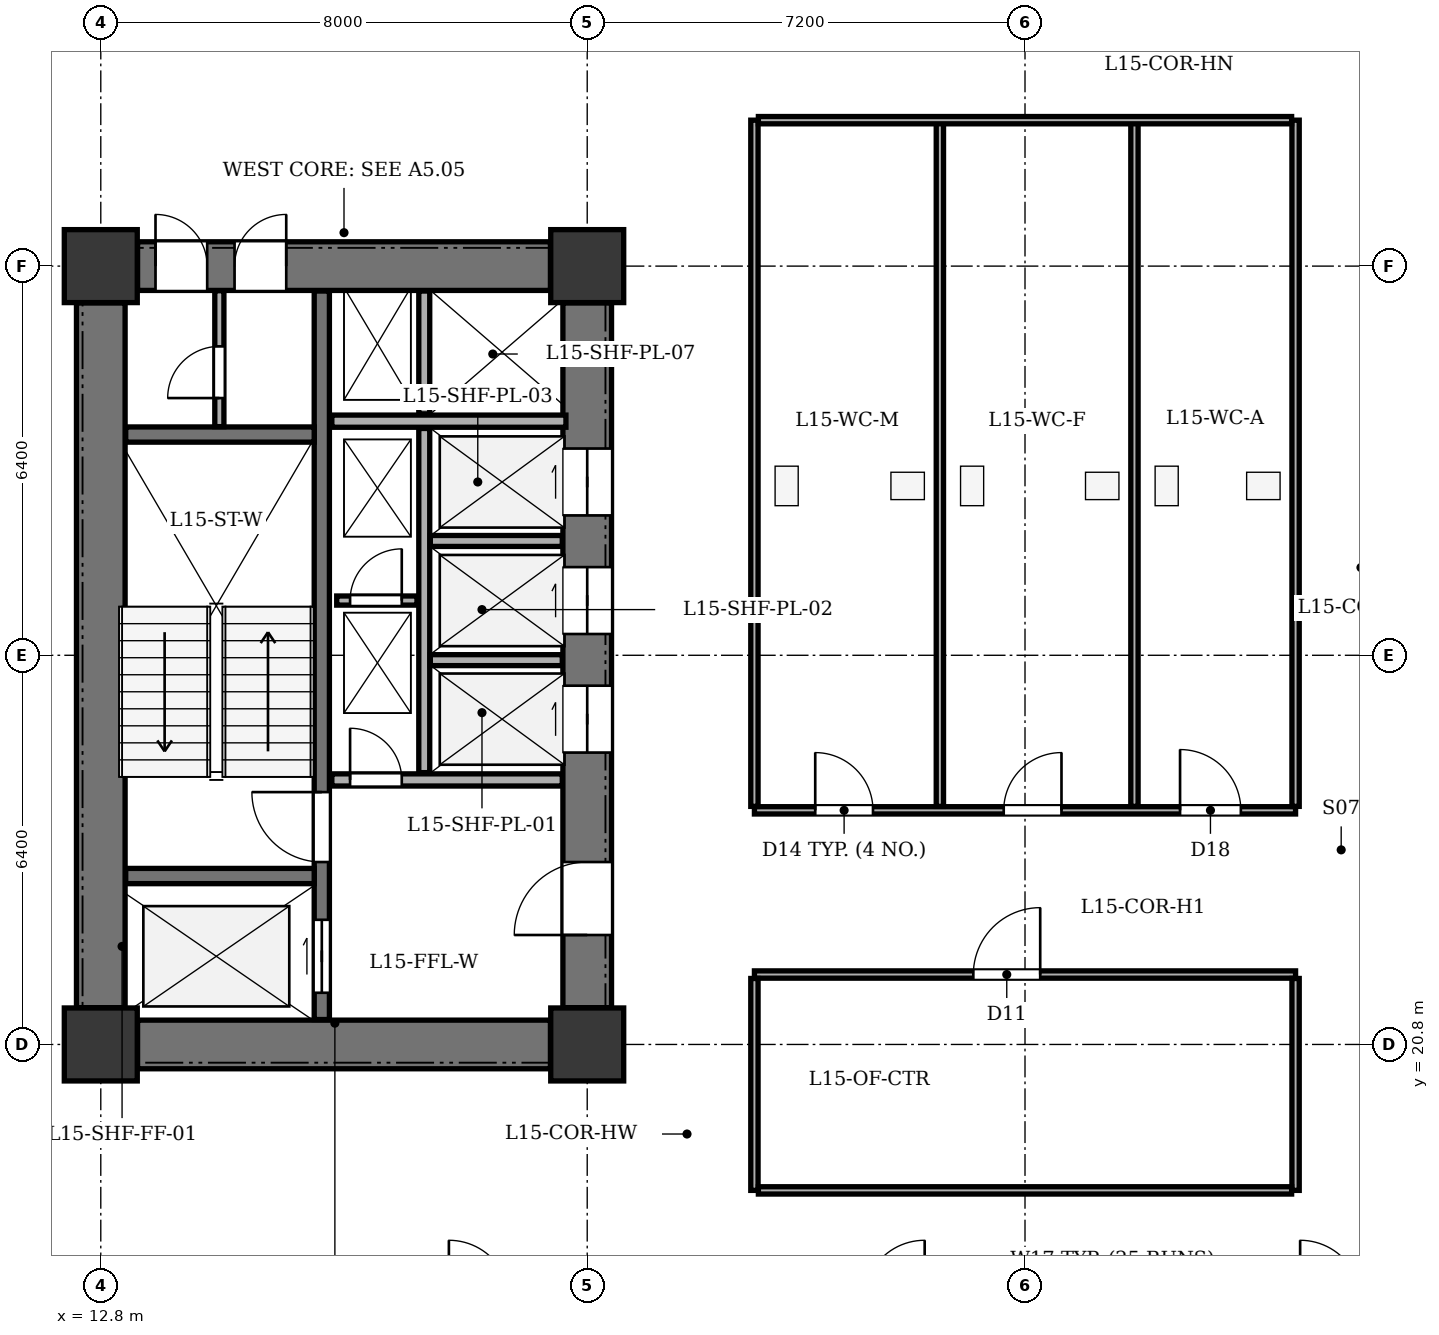
"""IFC4 building model, lengths in metres.
Left out: names, types, materials, properties, quantities, classifications, styles, units other than length and angle.
Written with IfcOpenShell. Run it as: python <this file> out.ifc"""

import sys

from ifc_helpers import new_model, si_unit, direction, frame, frame_2d, origin, origin_2d, place, context, subcontext, project, spatial, rectangle, extrude, element, fill, save


model = new_model("IFC4")
c1 = context("Model", 3, precision=1e-05, world=origin(), true_north=direction((0.0, 1.0)))
c2 = subcontext(c1, "Body", "Model", "MODEL_VIEW")
j1 = project(units=[si_unit("LENGTHUNIT", "METRE"), si_unit("PLANEANGLEUNIT", "RADIAN")], contexts=[c1])
p1 = place(None, origin())
s1 = spatial("IfcSite", under=j1, at=p1, CompositionType="ELEMENT")
p2 = place(p1, origin())
s2 = spatial("IfcBuilding", under=s1, at=p2, CompositionType="ELEMENT")
p3 = place(p2, frame((0.0, 0.0, 63.3)))
s3 = spatial("IfcBuildingStorey", under=s2, at=p3, CompositionType="ELEMENT", Elevation=63.3)
for number, where, z_axis, x_axis in (
    (1, (12.8, 20.8, 0.0), (0.0, 0.0, 1.0), (1.0, 0.0, 0.0)),
    (2, (20.8, 20.8, 0.0), (0.0, 0.0, 1.0), (1.0, 0.0, 0.0)),
    (3, (12.8, 33.6, 0.0), (0.0, 0.0, 1.0), (1.0, 0.0, 0.0)),
    (4, (20.8, 33.6, 0.0), (0.0, 0.0, 1.0), (1.0, 0.0, 0.0)),
):
    element("IfcColumn", number, at=place(p3, frame(where, z_axis=z_axis, x_axis=x_axis)), inside=s3, PredefinedType="COLUMN", context=c2, shape_type="SweptSolid", body=[
        extrude(rectangle(XDim=1.2, YDim=1.2, at=origin_2d()), origin(), (0.0, 0.0, 1.0), 3.9),
    ])
p4 = place(p3, frame((12.8, 21.405, 0.0), z_axis=(0.0, 0.0, 1.0), x_axis=(0.0, 1.0, 0.0)))
e5 = element("IfcWall", 5, at=p4, inside=s3, PredefinedType="SHEAR", context=c2, shape_type="SweptSolid", body=[
    extrude(rectangle(XDim=11.59, YDim=0.8, at=frame_2d((5.795, 0.0))), origin(), (0.0, 0.0, 1.0), 3.6),
])
p5 = place(p3, frame((13.405, 20.8, 0.0), z_axis=(0.0, 0.0, 1.0), x_axis=(1.0, 0.0, 0.0)))
e6 = element("IfcWall", 6, at=p5, inside=s3, PredefinedType="SHEAR", context=c2, shape_type="SweptSolid", body=[
    extrude(rectangle(XDim=6.79, YDim=0.8, at=frame_2d((3.395, 0.0))), origin(), (0.0, 0.0, 1.0), 3.6),
])
p6 = place(p3, frame((13.405, 33.6, 0.0), z_axis=(0.0, 0.0, 1.0), x_axis=(1.0, 0.0, 0.0)))
e7 = element("IfcWall", 7, at=p6, inside=s3, PredefinedType="SHEAR", context=c2, shape_type="SweptSolid", body=[
    extrude(rectangle(XDim=6.79, YDim=0.8, at=frame_2d((3.395, 0.0))), origin(), (0.0, 0.0, 1.0), 3.6),
])
p7 = place(p6, frame((0.295, 0.0, 0.0)))
e8 = element("IfcOpeningElement", 8, at=p7, cuts=e7, PredefinedType="OPENING", context=c2, shape_type="SweptSolid", body=[
    extrude(rectangle(XDim=0.85, YDim=2.02, at=frame_2d((0.425, 1.01))), frame((0.0, 0.41, 0.0), z_axis=(0.0, -1.0, 0.0), x_axis=(1.0, 0.0, 0.0)), (0.0, 0.0, 1.0), 0.82),
])
p8 = place(p6, frame((1.595, 0.0, 0.0)))
e9 = element("IfcOpeningElement", 9, at=p8, cuts=e7, PredefinedType="OPENING", context=c2, shape_type="SweptSolid", body=[
    extrude(rectangle(XDim=0.85, YDim=2.02, at=frame_2d((0.425, 1.01))), frame((0.0, 0.41, 0.0), z_axis=(0.0, -1.0, 0.0), x_axis=(1.0, 0.0, 0.0)), (0.0, 0.0, 1.0), 0.82),
])
p9 = place(p3, frame((20.8, 21.405, 0.0), z_axis=(0.0, 0.0, 1.0), x_axis=(0.0, 1.0, 0.0)))
e10 = element("IfcWall", 10, at=p9, inside=s3, PredefinedType="SHEAR", context=c2, shape_type="SweptSolid", body=[
    extrude(rectangle(XDim=11.59, YDim=0.8, at=frame_2d((5.795, 0.0))), origin(), (0.0, 0.0, 1.0), 3.6),
])
p10 = place(p9, frame((1.195, 0.0, 0.0)))
e11 = element("IfcOpeningElement", 11, at=p10, cuts=e10, PredefinedType="OPENING", context=c2, shape_type="SweptSolid", body=[
    extrude(rectangle(XDim=1.2, YDim=2.15, at=frame_2d((0.6, 1.075))), frame((0.0, 0.41, 0.0), z_axis=(0.0, -1.0, 0.0), x_axis=(1.0, 0.0, 0.0)), (0.0, 0.0, 1.0), 0.82),
])
p11 = place(p9, frame((4.195, 0.0, 0.0)))
e12 = element("IfcOpeningElement", 12, at=p11, cuts=e10, PredefinedType="OPENING", context=c2, shape_type="SweptSolid", body=[
    extrude(rectangle(XDim=1.1, YDim=2.1, at=frame_2d((0.55, 1.05))), frame((0.0, 0.41, 0.0), z_axis=(0.0, -1.0, 0.0), x_axis=(1.0, 0.0, 0.0)), (0.0, 0.0, 1.0), 0.82),
])
p12 = place(p9, frame((6.145, 0.0, 0.0)))
e13 = element("IfcOpeningElement", 13, at=p12, cuts=e10, PredefinedType="OPENING", context=c2, shape_type="SweptSolid", body=[
    extrude(rectangle(XDim=1.1, YDim=2.1, at=frame_2d((0.55, 1.05))), frame((0.0, 0.41, 0.0), z_axis=(0.0, -1.0, 0.0), x_axis=(1.0, 0.0, 0.0)), (0.0, 0.0, 1.0), 0.82),
])
p13 = place(p9, frame((8.095, 0.0, 0.0)))
e14 = element("IfcOpeningElement", 14, at=p13, cuts=e10, PredefinedType="OPENING", context=c2, shape_type="SweptSolid", body=[
    extrude(rectangle(XDim=1.1, YDim=2.1, at=frame_2d((0.55, 1.05))), frame((0.0, 0.41, 0.0), z_axis=(0.0, -1.0, 0.0), x_axis=(1.0, 0.0, 0.0)), (0.0, 0.0, 1.0), 0.82),
])
p14 = place(p3, frame((16.435, 21.21, 0.0), z_axis=(0.0, 0.0, 1.0), x_axis=(0.0, 1.0, 0.0)))
e15 = element("IfcWall", 15, at=p14, inside=s3, PredefinedType="SHEAR", context=c2, shape_type="SweptSolid", body=[
    extrude(rectangle(XDim=11.98, YDim=0.25, at=frame_2d((5.99, 0.0))), origin(), (0.0, 0.0, 1.0), 3.6),
])
p15 = place(p14, frame((0.44, 0.0, 0.0)))
e16 = element("IfcOpeningElement", 16, at=p15, cuts=e15, PredefinedType="OPENING", context=c2, shape_type="SweptSolid", body=[
    extrude(rectangle(XDim=1.2, YDim=2.15, at=frame_2d((0.6, 1.075))), frame((0.0, 0.135, 0.0), z_axis=(0.0, -1.0, 0.0), x_axis=(1.0, 0.0, 0.0)), (0.0, 0.0, 1.0), 0.27),
])
p16 = place(p14, frame((2.59, 0.0, 0.0)))
e17 = element("IfcOpeningElement", 17, at=p16, cuts=e15, PredefinedType="OPENING", context=c2, shape_type="SweptSolid", body=[
    extrude(rectangle(XDim=1.15, YDim=2.15, at=frame_2d((0.575, 1.075))), frame((0.0, 0.135, 0.0), z_axis=(0.0, -1.0, 0.0), x_axis=(1.0, 0.0, 0.0)), (0.0, 0.0, 1.0), 0.27),
])
for number, where, z_axis, x_axis in (
    (18, (13.21, 23.57, 0.0), (0.0, 0.0, 1.0), (1.0, 0.0, 0.0)),
    (19, (13.21, 30.83, 0.0), (0.0, 0.0, 1.0), (1.0, 0.0, 0.0)),
):
    element("IfcWall", number, at=place(p3, frame(where, z_axis=z_axis, x_axis=x_axis)), inside=s3, PredefinedType="SHEAR", context=c2, shape_type="SweptSolid", body=[
        extrude(rectangle(XDim=3.1, YDim=0.25, at=frame_2d((1.55, 0.0))), origin(), (0.0, 0.0, 1.0), 3.6),
    ])
p17 = place(p3, frame((16.6, 25.15, 0.0), z_axis=(0.0, 0.0, 1.0), x_axis=(1.0, 0.0, 0.0)))
e20 = element("IfcWall", 20, at=p17, inside=s3, PredefinedType="SOLIDWALL", context=c2, shape_type="SweptSolid", body=[
    extrude(rectangle(XDim=3.79, YDim=0.2, at=frame_2d((1.895, 0.0))), origin(), (0.0, 0.0, 1.0), 3.6),
])
p18 = place(p17, frame((0.3, 0.0, 0.0)))
e21 = element("IfcOpeningElement", 21, at=p18, cuts=e20, PredefinedType="OPENING", context=c2, shape_type="SweptSolid", body=[
    extrude(rectangle(XDim=0.85, YDim=2.02, at=frame_2d((0.425, 1.01))), frame((0.0, 0.11, 0.0), z_axis=(0.0, -1.0, 0.0), x_axis=(1.0, 0.0, 0.0)), (0.0, 0.0, 1.0), 0.22),
])
p19 = place(p3, frame((16.6, 31.05, 0.0), z_axis=(0.0, 0.0, 1.0), x_axis=(1.0, 0.0, 0.0)))
e22 = element("IfcWall", 22, at=p19, inside=s3, PredefinedType="SOLIDWALL", context=c2, shape_type="SweptSolid", body=[
    extrude(rectangle(XDim=3.85, YDim=0.2, at=frame_2d((1.925, 0.0))), origin(), (0.0, 0.0, 1.0), 3.6),
])
p20 = place(p3, frame((18.12, 25.27, 0.0), z_axis=(0.0, 0.0, 1.0), x_axis=(0.0, 1.0, 0.0)))
e23 = element("IfcWall", 23, at=p20, inside=s3, PredefinedType="PARTITIONING", context=c2, shape_type="SweptSolid", body=[
    extrude(rectangle(XDim=5.66, YDim=0.18, at=frame_2d((2.83, 0.0))), origin(), (0.0, 0.0, 1.0), 3.6),
])
p21 = place(p3, frame((18.12, 31.17, 0.0), z_axis=(0.0, 0.0, 1.0), x_axis=(0.0, 1.0, 0.0)))
e24 = element("IfcWall", 24, at=p21, inside=s3, PredefinedType="PARTITIONING", context=c2, shape_type="SweptSolid", body=[
    extrude(rectangle(XDim=2.02, YDim=0.18, at=frame_2d((1.01, 0.0))), origin(), (0.0, 0.0, 1.0), 3.6),
])
for number, where, z_axis, x_axis in (
    (25, (18.22, 27.12, 0.0), (0.0, 0.0, 1.0), (1.0, 0.0, 0.0)),
    (26, (18.22, 29.08, 0.0), (0.0, 0.0, 1.0), (1.0, 0.0, 0.0)),
):
    element("IfcWall", number, at=place(p3, frame(where, z_axis=z_axis, x_axis=x_axis)), inside=s3, PredefinedType="PARTITIONING", context=c2, shape_type="SweptSolid", body=[
        extrude(rectangle(XDim=2.17, YDim=0.18, at=frame_2d((1.085, 0.0))), origin(), (0.0, 0.0, 1.0), 3.6),
    ])
p22 = place(p3, frame((14.75, 30.96, 0.0), z_axis=(0.0, 0.0, 1.0), x_axis=(0.0, 1.0, 0.0)))
e27 = element("IfcWall", 27, at=p22, inside=s3, PredefinedType="PARTITIONING", context=c2, shape_type="SweptSolid", body=[
    extrude(rectangle(XDim=2.235, YDim=0.15, at=frame_2d((1.118, 0.0))), origin(), (0.0, 0.0, 1.0), 3.6),
])
p23 = place(p22, frame((0.47, 0.0, 0.0)))
e28 = element("IfcOpeningElement", 28, at=p23, cuts=e27, PredefinedType="OPENING", context=c2, shape_type="SweptSolid", body=[
    extrude(rectangle(XDim=0.85, YDim=2.02, at=frame_2d((0.425, 1.01))), frame((0.0, 0.085, 0.0), z_axis=(0.0, -1.0, 0.0), x_axis=(1.0, 0.0, 0.0)), (0.0, 0.0, 1.0), 0.17),
])
p24 = place(p3, frame((16.68, 28.1, 0.0), z_axis=(0.0, 0.0, 1.0), x_axis=(1.0, 0.0, 0.0)))
e29 = element("IfcWall", 29, at=p24, inside=s3, PredefinedType="PARTITIONING", context=c2, shape_type="SweptSolid", body=[
    extrude(rectangle(XDim=1.32, YDim=0.15, at=frame_2d((0.66, 0.0))), origin(), (0.0, 0.0, 1.0), 3.6),
])
p25 = place(p24, frame((0.22, 0.0, 0.0)))
e30 = element("IfcOpeningElement", 30, at=p25, cuts=e29, PredefinedType="OPENING", context=c2, shape_type="SweptSolid", body=[
    extrude(rectangle(XDim=0.85, YDim=2.02, at=frame_2d((0.425, 1.01))), frame((0.0, 0.085, 0.0), z_axis=(0.0, -1.0, 0.0), x_axis=(1.0, 0.0, 0.0)), (0.0, 0.0, 1.0), 0.17),
])
p26 = place(p3, frame((23.55, 24.65, 0.0), z_axis=(0.0, 0.0, 1.0), x_axis=(1.0, 0.0, 0.0)))
e31 = element("IfcWall", 31, at=p26, inside=s3, PredefinedType="PARTITIONING", context=c2, shape_type="SweptSolid", body=[
    extrude(rectangle(XDim=8.9, YDim=0.12, at=frame_2d((4.45, 0.0))), origin(), (0.0, 0.0, 1.0), 3.135),
])
p27 = place(p26, frame((1.0, 0.0, 0.0)))
e32 = element("IfcOpeningElement", 32, at=p27, cuts=e31, PredefinedType="OPENING", context=c2, shape_type="SweptSolid", body=[
    extrude(rectangle(XDim=0.95, YDim=2.1, at=frame_2d((0.475, 1.05))), frame((0.0, 0.07, 0.0), z_axis=(0.0, -1.0, 0.0), x_axis=(1.0, 0.0, 0.0)), (0.0, 0.0, 1.0), 0.14),
])
p28 = place(p26, frame((4.1, 0.0, 0.0)))
e33 = element("IfcOpeningElement", 33, at=p28, cuts=e31, PredefinedType="OPENING", context=c2, shape_type="SweptSolid", body=[
    extrude(rectangle(XDim=0.95, YDim=2.1, at=frame_2d((0.475, 1.05))), frame((0.0, 0.07, 0.0), z_axis=(0.0, -1.0, 0.0), x_axis=(1.0, 0.0, 0.0)), (0.0, 0.0, 1.0), 0.14),
])
p29 = place(p26, frame((7.0, 0.0, 0.0)))
e34 = element("IfcOpeningElement", 34, at=p29, cuts=e31, PredefinedType="OPENING", context=c2, shape_type="SweptSolid", body=[
    extrude(rectangle(XDim=1.0, YDim=2.1, at=frame_2d((0.5, 1.05))), frame((0.0, 0.07, 0.0), z_axis=(0.0, -1.0, 0.0), x_axis=(1.0, 0.0, 0.0)), (0.0, 0.0, 1.0), 0.14),
])
for number, where, z_axis, x_axis in (
    (35, (23.55, 24.715, 0.0), (0.0, 0.0, 1.0), (0.0, 1.0, 0.0)),
    (36, (32.45, 24.715, 0.0), (0.0, 0.0, 1.0), (0.0, 1.0, 0.0)),
    (37, (26.6, 24.715, 0.0), (0.0, 0.0, 1.0), (0.0, 1.0, 0.0)),
):
    element("IfcWall", number, at=place(p3, frame(where, z_axis=z_axis, x_axis=x_axis)), inside=s3, PredefinedType="PARTITIONING", context=c2, shape_type="SweptSolid", body=[
        extrude(rectangle(XDim=11.285, YDim=0.12, at=frame_2d((5.643, 0.0))), origin(), (0.0, 0.0, 1.0), 3.6),
    ])
p30 = place(p3, frame((29.8, 24.715, 0.0), z_axis=(0.0, 0.0, 1.0), x_axis=(0.0, 1.0, 0.0)))
e38 = element("IfcWall", 38, at=p30, inside=s3, PredefinedType="PARTITIONING", context=c2, shape_type="SweptSolid", body=[
    extrude(rectangle(XDim=11.285, YDim=0.12, at=frame_2d((5.643, 0.0))), origin(), (0.0, 0.0, 1.0), 3.135),
])
p31 = place(p3, frame((23.615, 36.0, 0.0), z_axis=(0.0, 0.0, 1.0), x_axis=(1.0, 0.0, 0.0)))
e39 = element("IfcWall", 39, at=p31, inside=s3, PredefinedType="PARTITIONING", context=c2, shape_type="SweptSolid", body=[
    extrude(rectangle(XDim=8.77, YDim=0.12, at=frame_2d((4.385, 0.0))), origin(), (0.0, 0.0, 1.0), 3.6),
])
p32 = place(p3, frame((23.55, 21.95, 0.0), z_axis=(0.0, 0.0, 1.0), x_axis=(1.0, 0.0, 0.0)))
e40 = element("IfcWall", 40, at=p32, inside=s3, PredefinedType="PARTITIONING", context=c2, shape_type="SweptSolid", body=[
    extrude(rectangle(XDim=8.9, YDim=0.12, at=frame_2d((4.45, 0.0))), origin(), (0.0, 0.0, 1.0), 3.135),
])
p33 = place(p32, frame((3.6, 0.0, 0.0)))
e41 = element("IfcOpeningElement", 41, at=p33, cuts=e40, PredefinedType="OPENING", context=c2, shape_type="SweptSolid", body=[
    extrude(rectangle(XDim=1.1, YDim=2.15, at=frame_2d((0.55, 1.075))), frame((0.0, 0.07, 0.0), z_axis=(0.0, -1.0, 0.0), x_axis=(1.0, 0.0, 0.0)), (0.0, 0.0, 1.0), 0.14),
])
for number, where, z_axis, x_axis in (
    (42, (23.55, 18.4, 0.0), (0.0, 0.0, 1.0), (0.0, 1.0, 0.0)),
    (43, (32.45, 18.4, 0.0), (0.0, 0.0, 1.0), (0.0, 1.0, 0.0)),
):
    element("IfcWall", number, at=place(p3, frame(where, z_axis=z_axis, x_axis=x_axis)), inside=s3, PredefinedType="PARTITIONING", context=c2, shape_type="SweptSolid", body=[
        extrude(rectangle(XDim=3.485, YDim=0.12, at=frame_2d((1.743, 0.0))), origin(), (0.0, 0.0, 1.0), 3.6),
    ])
p34 = place(p3, frame((23.615, 18.4, 0.0), z_axis=(0.0, 0.0, 1.0), x_axis=(1.0, 0.0, 0.0)))
e44 = element("IfcWall", 44, at=p34, inside=s3, PredefinedType="PARTITIONING", context=c2, shape_type="SweptSolid", body=[
    extrude(rectangle(XDim=8.77, YDim=0.12, at=frame_2d((4.385, 0.0))), origin(), (0.0, 0.0, 1.0), 3.6),
])
p35 = place(p7, origin())
e45 = element("IfcDoor", 45, at=p35, inside=s3, OperationType="SINGLE_SWING_LEFT", PredefinedType="DOOR", context=c2, shape_type="SweptSolid", body=[
    extrude(rectangle(XDim=0.85, YDim=2.02, at=frame_2d((0.425, 1.01))), frame((0.0, 0.025, 0.0), z_axis=(0.0, -1.0, 0.0), x_axis=(1.0, 0.0, 0.0)), (0.0, 0.0, 1.0), 0.05),
])
fill(e8, e45)
p36 = place(p8, origin())
e46 = element("IfcDoor", 46, at=p36, inside=s3, OperationType="SINGLE_SWING_RIGHT", PredefinedType="DOOR", context=c2, shape_type="SweptSolid", body=[
    extrude(rectangle(XDim=0.85, YDim=2.02, at=frame_2d((0.425, 1.01))), frame((0.0, 0.025, 0.0), z_axis=(0.0, -1.0, 0.0), x_axis=(1.0, 0.0, 0.0)), (0.0, 0.0, 1.0), 0.05),
])
fill(e9, e46)
p37 = place(p10, origin())
e47 = element("IfcDoor", 47, at=p37, inside=s3, OperationType="SINGLE_SWING_LEFT", PredefinedType="DOOR", context=c2, shape_type="SweptSolid", body=[
    extrude(rectangle(XDim=1.2, YDim=2.15, at=frame_2d((0.6, 1.075))), frame((0.0, 0.025, 0.0), z_axis=(0.0, -1.0, 0.0), x_axis=(1.0, 0.0, 0.0)), (0.0, 0.0, 1.0), 0.05),
])
fill(e11, e47)
p38 = place(p11, origin())
e48 = element("IfcDoor", 48, at=p38, inside=s3, OperationType="DOUBLE_DOOR_SLIDING", PredefinedType="DOOR", context=c2, shape_type="SweptSolid", body=[
    extrude(rectangle(XDim=1.1, YDim=2.1, at=frame_2d((0.55, 1.05))), frame((0.0, 0.025, 0.0), z_axis=(0.0, -1.0, 0.0), x_axis=(1.0, 0.0, 0.0)), (0.0, 0.0, 1.0), 0.05),
])
fill(e12, e48)
p39 = place(p12, origin())
e49 = element("IfcDoor", 49, at=p39, inside=s3, OperationType="DOUBLE_DOOR_SLIDING", PredefinedType="DOOR", context=c2, shape_type="SweptSolid", body=[
    extrude(rectangle(XDim=1.1, YDim=2.1, at=frame_2d((0.55, 1.05))), frame((0.0, 0.025, 0.0), z_axis=(0.0, -1.0, 0.0), x_axis=(1.0, 0.0, 0.0)), (0.0, 0.0, 1.0), 0.05),
])
fill(e13, e49)
p40 = place(p13, origin())
e50 = element("IfcDoor", 50, at=p40, inside=s3, OperationType="DOUBLE_DOOR_SLIDING", PredefinedType="DOOR", context=c2, shape_type="SweptSolid", body=[
    extrude(rectangle(XDim=1.1, YDim=2.1, at=frame_2d((0.55, 1.05))), frame((0.0, 0.025, 0.0), z_axis=(0.0, -1.0, 0.0), x_axis=(1.0, 0.0, 0.0)), (0.0, 0.0, 1.0), 0.05),
])
fill(e14, e50)
p41 = place(p15, origin())
e51 = element("IfcDoor", 51, at=p41, inside=s3, OperationType="DOUBLE_DOOR_SLIDING", PredefinedType="DOOR", context=c2, shape_type="SweptSolid", body=[
    extrude(rectangle(XDim=1.2, YDim=2.15, at=frame_2d((0.6, 1.075))), frame((0.0, 0.025, 0.0), z_axis=(0.0, -1.0, 0.0), x_axis=(1.0, 0.0, 0.0)), (0.0, 0.0, 1.0), 0.05),
])
fill(e16, e51)
p42 = place(p16, origin())
e52 = element("IfcDoor", 52, at=p42, inside=s3, OperationType="SINGLE_SWING_RIGHT", PredefinedType="DOOR", context=c2, shape_type="SweptSolid", body=[
    extrude(rectangle(XDim=1.15, YDim=2.15, at=frame_2d((0.575, 1.075))), frame((0.0, 0.025, 0.0), z_axis=(0.0, -1.0, 0.0), x_axis=(1.0, 0.0, 0.0)), (0.0, 0.0, 1.0), 0.05),
])
fill(e17, e52)
p43 = place(p18, origin())
e53 = element("IfcDoor", 53, at=p43, inside=s3, OperationType="SINGLE_SWING_LEFT", PredefinedType="DOOR", context=c2, shape_type="SweptSolid", body=[
    extrude(rectangle(XDim=0.85, YDim=2.02, at=frame_2d((0.425, 1.01))), frame((0.0, 0.025, 0.0), z_axis=(0.0, -1.0, 0.0), x_axis=(1.0, 0.0, 0.0)), (0.0, 0.0, 1.0), 0.05),
])
fill(e21, e53)
p44 = place(p23, origin())
e54 = element("IfcDoor", 54, at=p44, inside=s3, OperationType="SINGLE_SWING_LEFT", PredefinedType="DOOR", context=c2, shape_type="SweptSolid", body=[
    extrude(rectangle(XDim=0.85, YDim=2.02, at=frame_2d((0.425, 1.01))), frame((0.0, 0.025, 0.0), z_axis=(0.0, -1.0, 0.0), x_axis=(1.0, 0.0, 0.0)), (0.0, 0.0, 1.0), 0.05),
])
fill(e28, e54)
p45 = place(p25, origin())
e55 = element("IfcDoor", 55, at=p45, inside=s3, OperationType="SINGLE_SWING_RIGHT", PredefinedType="DOOR", context=c2, shape_type="SweptSolid", body=[
    extrude(rectangle(XDim=0.85, YDim=2.02, at=frame_2d((0.425, 1.01))), frame((0.0, 0.025, 0.0), z_axis=(0.0, -1.0, 0.0), x_axis=(1.0, 0.0, 0.0)), (0.0, 0.0, 1.0), 0.05),
])
fill(e30, e55)
p46 = place(p27, origin())
e56 = element("IfcDoor", 56, at=p46, inside=s3, OperationType="SINGLE_SWING_LEFT", PredefinedType="DOOR", context=c2, shape_type="SweptSolid", body=[
    extrude(rectangle(XDim=0.95, YDim=2.1, at=frame_2d((0.475, 1.05))), frame((0.0, 0.025, 0.0), z_axis=(0.0, -1.0, 0.0), x_axis=(1.0, 0.0, 0.0)), (0.0, 0.0, 1.0), 0.05),
])
fill(e32, e56)
p47 = place(p28, origin())
e57 = element("IfcDoor", 57, at=p47, inside=s3, OperationType="SINGLE_SWING_RIGHT", PredefinedType="DOOR", context=c2, shape_type="SweptSolid", body=[
    extrude(rectangle(XDim=0.95, YDim=2.1, at=frame_2d((0.475, 1.05))), frame((0.0, 0.025, 0.0), z_axis=(0.0, -1.0, 0.0), x_axis=(1.0, 0.0, 0.0)), (0.0, 0.0, 1.0), 0.05),
])
fill(e33, e57)
p48 = place(p29, origin())
e58 = element("IfcDoor", 58, at=p48, inside=s3, OperationType="SINGLE_SWING_LEFT", PredefinedType="DOOR", context=c2, shape_type="SweptSolid", body=[
    extrude(rectangle(XDim=1.0, YDim=2.1, at=frame_2d((0.5, 1.05))), frame((0.0, 0.025, 0.0), z_axis=(0.0, -1.0, 0.0), x_axis=(1.0, 0.0, 0.0)), (0.0, 0.0, 1.0), 0.05),
])
fill(e34, e58)
p49 = place(p33, origin())
e59 = element("IfcDoor", 59, at=p49, inside=s3, OperationType="SINGLE_SWING_RIGHT", PredefinedType="DOOR", context=c2, shape_type="SweptSolid", body=[
    extrude(rectangle(XDim=1.1, YDim=2.15, at=frame_2d((0.55, 1.075))), frame((0.0, 0.025, 0.0), z_axis=(0.0, -1.0, 0.0), x_axis=(1.0, 0.0, 0.0)), (0.0, 0.0, 1.0), 0.05),
])
fill(e41, e59)
save(model, sys.argv[1])
